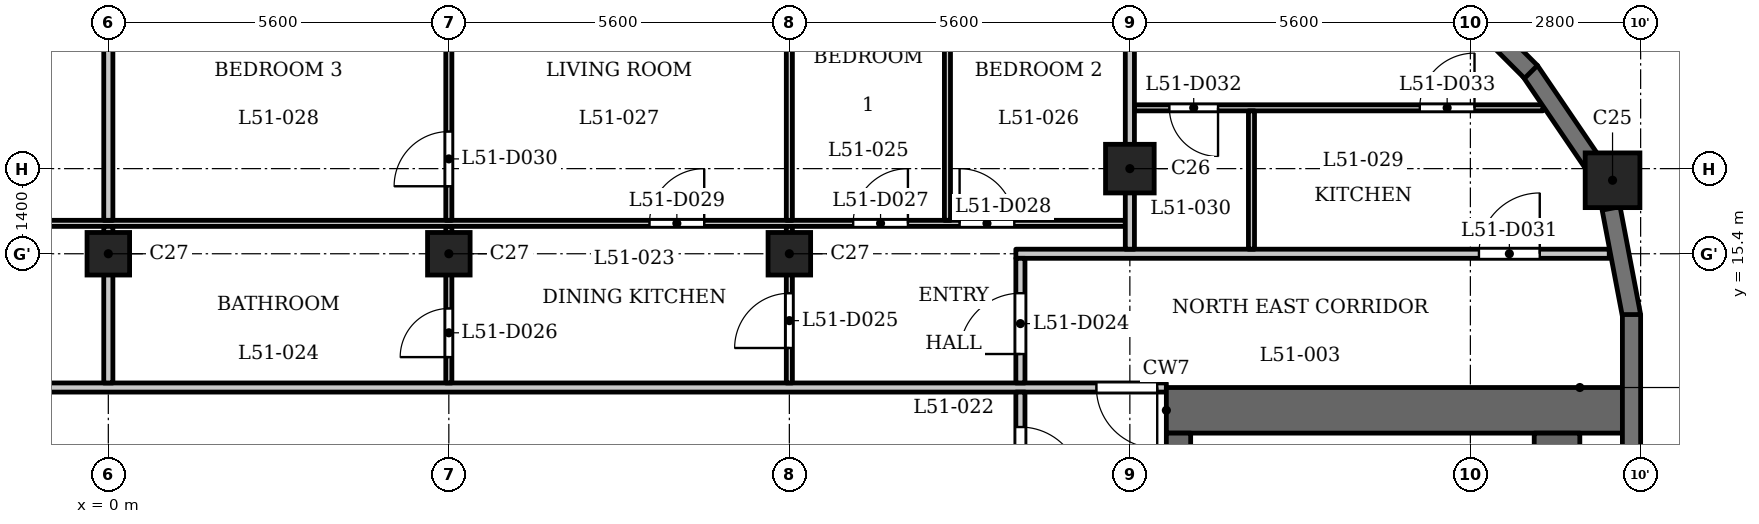
"""IFC4 building model, lengths in metres.
Left out: names, types, materials, properties, quantities, classifications, styles, units other than length and angle.
Written with IfcOpenShell. Run it as: python <this file> out.ifc"""

import sys

from ifc_helpers import new_model, si_unit, direction, frame, frame_2d, origin, origin_2d, place, context, subcontext, project, spatial, rectangle, extrude, element, fill, save


model = new_model("IFC4")
c1 = context("Model", 3, precision=1e-05, world=origin(), true_north=direction((0.0, 1.0)))
c2 = subcontext(c1, "Body", "Model", "MODEL_VIEW")
j1 = project(units=[si_unit("LENGTHUNIT", "METRE"), si_unit("PLANEANGLEUNIT", "RADIAN")], contexts=[c1])
p1 = place(None, origin())
s1 = spatial("IfcSite", under=j1, at=p1, CompositionType="ELEMENT")
p2 = place(p1, origin())
s2 = spatial("IfcBuilding", under=s1, at=p2, CompositionType="ELEMENT")
p3 = place(p2, frame((0.0, 0.0, 199.4)))
s3 = spatial("IfcBuildingStorey", under=s2, at=p3, CompositionType="ELEMENT", Elevation=199.4)
p4 = place(p3, frame((24.738, 16.609, 0.0), z_axis=(0.0, 0.0, 1.0), x_axis=(1.0, 0.0, 0.0)))
e1 = element("IfcColumn", 1, at=p4, inside=s3, PredefinedType="COLUMN", context=c2, shape_type="SweptSolid", body=[
    extrude(rectangle(XDim=0.9, YDim=0.9, at=origin_2d()), origin(), (0.0, 0.0, 1.0), 3.5),
])
p5 = place(p3, frame((16.8, 16.8, 0.0), z_axis=(0.0, 0.0, 1.0), x_axis=(1.0, 0.0, 0.0)))
e2 = element("IfcColumn", 2, at=p5, inside=s3, PredefinedType="COLUMN", context=c2, shape_type="SweptSolid", body=[
    extrude(rectangle(XDim=0.8, YDim=0.8, at=origin_2d()), origin(), (0.0, 0.0, 1.0), 3.5),
])
for number, where, z_axis, x_axis in (
    (3, (0.0, 15.4, 0.0), (0.0, 0.0, 1.0), (1.0, 0.0, 0.0)),
    (4, (5.6, 15.4, 0.0), (0.0, 0.0, 1.0), (1.0, 0.0, 0.0)),
    (5, (11.2, 15.4, 0.0), (0.0, 0.0, 1.0), (1.0, 0.0, 0.0)),
):
    element("IfcColumn", number, at=place(p3, frame(where, z_axis=z_axis, x_axis=x_axis)), inside=s3, PredefinedType="COLUMN", context=c2, shape_type="SweptSolid", body=[
        extrude(rectangle(XDim=0.7, YDim=0.7, at=origin_2d()), origin(), (0.0, 0.0, 1.0), 3.5),
    ])
p6 = place(p3, frame((25.05, 11.65, 0.0), z_axis=(0.0, 0.0, 1.0), x_axis=(0.0, 1.0, 0.0)))
e6 = element("IfcWall", 6, at=p6, inside=s3, PredefinedType="SOLIDWALL", context=c2, shape_type="SweptSolid", body=[
    extrude(rectangle(XDim=2.75, YDim=0.3, at=frame_2d((1.375, 0.0))), origin(), (0.0, 0.0, 1.0), 2.5),
])
for number, where, z_axis, x_axis in (
    (7, (25.053, 14.372, 0.0), (0.0, 0.0, 1.0), (-0.187, 0.982, 0.0)),
    (8, (24.394, 16.919, 0.0), (0.0, 0.0, 1.0), (-0.562, 0.827, 0.0)),
):
    element("IfcWall", number, at=place(p3, frame(where, z_axis=z_axis, x_axis=x_axis)), inside=s3, PredefinedType="SOLIDWALL", context=c2, shape_type="SweptSolid", body=[
        extrude(rectangle(XDim=1.806, YDim=0.3, at=frame_2d((0.903, 0.0))), origin(), (0.0, 0.0, 1.0), 2.5),
    ])
p7 = place(p3, frame((23.397, 18.391, 0.0), z_axis=(0.0, 0.0, 1.0), x_axis=(-0.707106781187, 0.707106781187, 0.0)))
e9 = element("IfcWall", 9, at=p7, inside=s3, PredefinedType="SOLIDWALL", context=c2, shape_type="SweptSolid", body=[
    extrude(rectangle(XDim=2.75, YDim=0.3, at=frame_2d((1.375, 0.0))), origin(), (0.0, 0.0, 1.0), 2.5),
])
p8 = place(p7, frame((0.775, 0.0, 0.6)))
e10 = element("IfcOpeningElement", 10, at=p8, cuts=e9, PredefinedType="OPENING", context=c2, shape_type="SweptSolid", body=[
    extrude(rectangle(XDim=1.2, YDim=1.55, at=frame_2d((0.6, 0.775))), frame((0.0, 0.16, 0.0), z_axis=(0.0, -1.0, 0.0), x_axis=(1.0, 0.0, 0.0)), (0.0, 0.0, 1.0), 0.32),
])
p9 = place(p3, frame((17.4, 12.825, 0.0), z_axis=(0.0, 0.0, 1.0), x_axis=(1.0, 0.0, 0.0)))
e11 = element("IfcWall", 11, at=p9, inside=s3, PredefinedType="SHEAR", context=c2, shape_type="SweptSolid", body=[
    extrude(rectangle(XDim=7.6, YDim=0.75, at=frame_2d((3.8, 0.0))), origin(), (0.0, 0.0, 1.0), 3.2),
])
p10 = place(p3, frame((17.6, -12.45, 0.0), z_axis=(0.0, 0.0, 1.0), x_axis=(0.0, 1.0, 0.0)))
e12 = element("IfcWall", 12, at=p10, inside=s3, PredefinedType="SHEAR", context=c2, shape_type="SweptSolid", body=[
    extrude(rectangle(XDim=24.9, YDim=0.4, at=frame_2d((12.45, 0.0))), origin(), (0.0, 0.0, 1.0), 3.2),
])
p11 = place(p10, frame((8.65, 0.0, 0.0)))
e13 = element("IfcOpeningElement", 13, at=p11, cuts=e12, PredefinedType="OPENING", context=c2, shape_type="SweptSolid", body=[
    extrude(rectangle(XDim=0.9, YDim=2.1, at=frame_2d((0.45, 1.05))), frame((0.0, 0.21, 0.0), z_axis=(0.0, -1.0, 0.0), x_axis=(1.0, 0.0, 0.0)), (0.0, 0.0, 1.0), 0.42),
])
p12 = place(p10, frame((15.6, 0.0, 0.0)))
e14 = element("IfcOpeningElement", 14, at=p12, cuts=e12, PredefinedType="OPENING", context=c2, shape_type="SweptSolid", body=[
    extrude(rectangle(XDim=1.1, YDim=2.1, at=frame_2d((0.55, 1.05))), frame((0.0, 0.21, 0.0), z_axis=(0.0, -1.0, 0.0), x_axis=(1.0, 0.0, 0.0)), (0.0, 0.0, 1.0), 0.42),
])
p13 = place(p10, frame((18.0, 0.0, 0.0)))
e15 = element("IfcOpeningElement", 15, at=p13, cuts=e12, PredefinedType="OPENING", context=c2, shape_type="SweptSolid", body=[
    extrude(rectangle(XDim=1.1, YDim=2.1, at=frame_2d((0.55, 1.05))), frame((0.0, 0.21, 0.0), z_axis=(0.0, -1.0, 0.0), x_axis=(1.0, 0.0, 0.0)), (0.0, 0.0, 1.0), 0.42),
])
p14 = place(p10, frame((23.025, 0.0, 0.0)))
e16 = element("IfcOpeningElement", 16, at=p14, cuts=e12, PredefinedType="OPENING", context=c2, shape_type="SweptSolid", body=[
    extrude(rectangle(XDim=1.1, YDim=2.1, at=frame_2d((0.55, 1.05))), frame((0.0, 0.21, 0.0), z_axis=(0.0, -1.0, 0.0), x_axis=(1.0, 0.0, 0.0)), (0.0, 0.0, 1.0), 0.42),
])
p15 = place(p10, frame((0.775, 0.0, 0.0)))
e17 = element("IfcOpeningElement", 17, at=p15, cuts=e12, PredefinedType="OPENING", context=c2, shape_type="SweptSolid", body=[
    extrude(rectangle(XDim=1.1, YDim=2.1, at=frame_2d((0.55, 1.05))), frame((0.0, 0.21, 0.0), z_axis=(0.0, -1.0, 0.0), x_axis=(1.0, 0.0, 0.0)), (0.0, 0.0, 1.0), 0.42),
])
p16 = place(p10, frame((12.925, 0.0, 0.0)))
e18 = element("IfcOpeningElement", 18, at=p16, cuts=e12, PredefinedType="OPENING", context=c2, shape_type="SweptSolid", body=[
    extrude(rectangle(XDim=1.8, YDim=2.1, at=frame_2d((0.9, 1.05))), frame((0.0, 0.21, 0.0), z_axis=(0.0, -1.0, 0.0), x_axis=(1.0, 0.0, 0.0)), (0.0, 0.0, 1.0), 0.42),
])
p17 = place(p3, frame((23.825, -12.45, 0.0), z_axis=(0.0, 0.0, 1.0), x_axis=(0.0, 1.0, 0.0)))
e19 = element("IfcWall", 19, at=p17, inside=s3, PredefinedType="SHEAR", context=c2, shape_type="SweptSolid", body=[
    extrude(rectangle(XDim=24.9, YDim=0.75, at=frame_2d((12.45, 0.0))), origin(), (0.0, 0.0, 1.0), 3.2),
])
p18 = place(p3, frame((-17.4, 13.2, 0.0), z_axis=(0.0, 0.0, 1.0), x_axis=(1.0, 0.0, 0.0)))
e20 = element("IfcWall", 20, at=p18, inside=s3, PredefinedType="PARTITIONING", context=c2, shape_type="SweptSolid", body=[
    extrude(rectangle(XDim=34.8, YDim=0.15, at=frame_2d((17.4, 0.0))), origin(), (0.0, 0.0, 1.0), 3.2),
])
p19 = place(p18, frame((0.25, 0.0, 0.0)))
e21 = element("IfcOpeningElement", 21, at=p19, cuts=e20, PredefinedType="OPENING", context=c2, shape_type="SweptSolid", body=[
    extrude(rectangle(XDim=1.0, YDim=2.1, at=frame_2d((0.5, 1.05))), frame((0.0, 0.085, 0.0), z_axis=(0.0, -1.0, 0.0), x_axis=(1.0, 0.0, 0.0)), (0.0, 0.0, 1.0), 0.17),
])
p20 = place(p18, frame((33.65, 0.0, 0.0)))
e22 = element("IfcOpeningElement", 22, at=p20, cuts=e20, PredefinedType="OPENING", context=c2, shape_type="SweptSolid", body=[
    extrude(rectangle(XDim=1.0, YDim=2.1, at=frame_2d((0.5, 1.05))), frame((0.0, 0.085, 0.0), z_axis=(0.0, -1.0, 0.0), x_axis=(1.0, 0.0, 0.0)), (0.0, 0.0, 1.0), 0.17),
])
p21 = place(p3, frame((14.925, 15.4, 0.0), z_axis=(0.0, 0.0, 1.0), x_axis=(1.0, 0.0, 0.0)))
e23 = element("IfcWall", 23, at=p21, inside=s3, PredefinedType="PARTITIONING", context=c2, shape_type="SweptSolid", body=[
    extrude(rectangle(XDim=9.759, YDim=0.15, at=frame_2d((4.879, 0.0))), origin(), (0.0, 0.0, 1.0), 3.2),
])
p22 = place(p21, frame((7.616, 0.0, 0.0)))
e24 = element("IfcOpeningElement", 24, at=p22, cuts=e23, PredefinedType="OPENING", context=c2, shape_type="SweptSolid", body=[
    extrude(rectangle(XDim=1.0, YDim=2.1, at=frame_2d((0.5, 1.05))), frame((0.0, 0.085, 0.0), z_axis=(0.0, -1.0, 0.0), x_axis=(1.0, 0.0, 0.0)), (0.0, 0.0, 1.0), 0.17),
])
p23 = place(p3, frame((-16.725, 15.9, 0.0), z_axis=(0.0, 0.0, 1.0), x_axis=(1.0, 0.0, 0.0)))
e25 = element("IfcWall", 25, at=p23, inside=s3, PredefinedType="PARTITIONING", context=c2, shape_type="SweptSolid", body=[
    extrude(rectangle(XDim=33.45, YDim=0.1, at=frame_2d((16.725, 0.0))), origin(), (0.0, 0.0, 1.0), 3.2),
])
p24 = place(p23, frame((1.875, 0.0, 0.0)))
e26 = element("IfcOpeningElement", 26, at=p24, cuts=e25, PredefinedType="OPENING", context=c2, shape_type="SweptSolid", body=[
    extrude(rectangle(XDim=0.9, YDim=2.1, at=frame_2d((0.45, 1.05))), frame((0.0, 0.06, 0.0), z_axis=(0.0, -1.0, 0.0), x_axis=(1.0, 0.0, 0.0)), (0.0, 0.0, 1.0), 0.12),
])
p25 = place(p23, frame((3.975, 0.0, 0.0)))
e27 = element("IfcOpeningElement", 27, at=p25, cuts=e25, PredefinedType="OPENING", context=c2, shape_type="SweptSolid", body=[
    extrude(rectangle(XDim=0.9, YDim=2.1, at=frame_2d((0.45, 1.05))), frame((0.0, 0.06, 0.0), z_axis=(0.0, -1.0, 0.0), x_axis=(1.0, 0.0, 0.0)), (0.0, 0.0, 1.0), 0.12),
])
p26 = place(p23, frame((6.825, 0.0, 0.0)))
e28 = element("IfcOpeningElement", 28, at=p26, cuts=e25, PredefinedType="OPENING", context=c2, shape_type="SweptSolid", body=[
    extrude(rectangle(XDim=0.9, YDim=2.1, at=frame_2d((0.45, 1.05))), frame((0.0, 0.06, 0.0), z_axis=(0.0, -1.0, 0.0), x_axis=(1.0, 0.0, 0.0)), (0.0, 0.0, 1.0), 0.12),
])
p27 = place(p23, frame((28.975, 0.0, 0.0)))
e29 = element("IfcOpeningElement", 29, at=p27, cuts=e25, PredefinedType="OPENING", context=c2, shape_type="SweptSolid", body=[
    extrude(rectangle(XDim=0.9, YDim=2.1, at=frame_2d((0.45, 1.05))), frame((0.0, 0.06, 0.0), z_axis=(0.0, -1.0, 0.0), x_axis=(1.0, 0.0, 0.0)), (0.0, 0.0, 1.0), 0.12),
])
p28 = place(p23, frame((30.725, 0.0, 0.0)))
e30 = element("IfcOpeningElement", 30, at=p28, cuts=e25, PredefinedType="OPENING", context=c2, shape_type="SweptSolid", body=[
    extrude(rectangle(XDim=0.9, YDim=2.1, at=frame_2d((0.45, 1.05))), frame((0.0, 0.06, 0.0), z_axis=(0.0, -1.0, 0.0), x_axis=(1.0, 0.0, 0.0)), (0.0, 0.0, 1.0), 0.12),
])
p29 = place(p23, frame((25.625, 0.0, 0.0)))
e31 = element("IfcOpeningElement", 31, at=p29, cuts=e25, PredefinedType="OPENING", context=c2, shape_type="SweptSolid", body=[
    extrude(rectangle(XDim=0.9, YDim=2.1, at=frame_2d((0.45, 1.05))), frame((0.0, 0.06, 0.0), z_axis=(0.0, -1.0, 0.0), x_axis=(1.0, 0.0, 0.0)), (0.0, 0.0, 1.0), 0.12),
])
p30 = place(p3, frame((16.875, 17.8, 0.0), z_axis=(0.0, 0.0, 1.0), x_axis=(1.0, 0.0, 0.0)))
e32 = element("IfcWall", 32, at=p30, inside=s3, PredefinedType="PARTITIONING", context=c2, shape_type="SweptSolid", body=[
    extrude(rectangle(XDim=6.719, YDim=0.1, at=frame_2d((3.359, 0.0))), origin(), (0.0, 0.0, 1.0), 3.2),
])
p31 = place(p30, frame((0.575, 0.0, 0.0)))
e33 = element("IfcOpeningElement", 33, at=p31, cuts=e32, PredefinedType="OPENING", context=c2, shape_type="SweptSolid", body=[
    extrude(rectangle(XDim=0.8, YDim=2.1, at=frame_2d((0.4, 1.05))), frame((0.0, 0.06, 0.0), z_axis=(0.0, -1.0, 0.0), x_axis=(1.0, 0.0, 0.0)), (0.0, 0.0, 1.0), 0.12),
])
p32 = place(p30, frame((4.693, 0.0, 0.0)))
e34 = element("IfcOpeningElement", 34, at=p32, cuts=e32, PredefinedType="OPENING", context=c2, shape_type="SweptSolid", body=[
    extrude(rectangle(XDim=0.9, YDim=2.1, at=frame_2d((0.45, 1.05))), frame((0.0, 0.06, 0.0), z_axis=(0.0, -1.0, 0.0), x_axis=(1.0, 0.0, 0.0)), (0.0, 0.0, 1.0), 0.12),
])
p33 = place(p3, frame((0.0, 13.275, 0.0), z_axis=(0.0, 0.0, 1.0), x_axis=(0.0, 1.0, 0.0)))
e35 = element("IfcWall", 35, at=p33, inside=s3, PredefinedType="PARTITIONING", context=c2, shape_type="SweptSolid", body=[
    extrude(rectangle(XDim=2.575, YDim=0.15, at=frame_2d((1.288, 0.0))), origin(), (0.0, 0.0, 1.0), 3.2),
])
p34 = place(p3, frame((0.0, 15.95, 0.0), z_axis=(0.0, 0.0, 1.0), x_axis=(0.0, 1.0, 0.0)))
e36 = element("IfcWall", 36, at=p34, inside=s3, PredefinedType="PARTITIONING", context=c2, shape_type="SweptSolid", body=[
    extrude(rectangle(XDim=6.13, YDim=0.15, at=frame_2d((3.065, 0.0))), origin(), (0.0, 0.0, 1.0), 3.2),
])
p35 = place(p3, frame((5.6, 13.275, 0.0), z_axis=(0.0, 0.0, 1.0), x_axis=(0.0, 1.0, 0.0)))
e37 = element("IfcWall", 37, at=p35, inside=s3, PredefinedType="PARTITIONING", context=c2, shape_type="SweptSolid", body=[
    extrude(rectangle(XDim=2.575, YDim=0.1, at=frame_2d((1.288, 0.0))), origin(), (0.0, 0.0, 1.0), 3.2),
])
p36 = place(p35, frame((0.425, 0.0, 0.0)))
e38 = element("IfcOpeningElement", 38, at=p36, cuts=e37, PredefinedType="OPENING", context=c2, shape_type="SweptSolid", body=[
    extrude(rectangle(XDim=0.8, YDim=2.1, at=frame_2d((0.4, 1.05))), frame((0.0, 0.06, 0.0), z_axis=(0.0, -1.0, 0.0), x_axis=(1.0, 0.0, 0.0)), (0.0, 0.0, 1.0), 0.12),
])
p37 = place(p3, frame((5.6, 15.95, 0.0), z_axis=(0.0, 0.0, 1.0), x_axis=(0.0, 1.0, 0.0)))
e39 = element("IfcWall", 39, at=p37, inside=s3, PredefinedType="PARTITIONING", context=c2, shape_type="SweptSolid", body=[
    extrude(rectangle(XDim=6.13, YDim=0.1, at=frame_2d((3.065, 0.0))), origin(), (0.0, 0.0, 1.0), 3.2),
])
p38 = place(p37, frame((0.56, 0.0, 0.0)))
e40 = element("IfcOpeningElement", 40, at=p38, cuts=e39, PredefinedType="OPENING", context=c2, shape_type="SweptSolid", body=[
    extrude(rectangle(XDim=0.9, YDim=2.1, at=frame_2d((0.45, 1.05))), frame((0.0, 0.06, 0.0), z_axis=(0.0, -1.0, 0.0), x_axis=(1.0, 0.0, 0.0)), (0.0, 0.0, 1.0), 0.12),
])
p39 = place(p3, frame((11.2, 13.275, 0.0), z_axis=(0.0, 0.0, 1.0), x_axis=(0.0, 1.0, 0.0)))
e41 = element("IfcWall", 41, at=p39, inside=s3, PredefinedType="PARTITIONING", context=c2, shape_type="SweptSolid", body=[
    extrude(rectangle(XDim=2.575, YDim=0.1, at=frame_2d((1.288, 0.0))), origin(), (0.0, 0.0, 1.0), 3.2),
])
p40 = place(p39, frame((0.575, 0.0, 0.0)))
e42 = element("IfcOpeningElement", 42, at=p40, cuts=e41, PredefinedType="OPENING", context=c2, shape_type="SweptSolid", body=[
    extrude(rectangle(XDim=0.9, YDim=2.1, at=frame_2d((0.45, 1.05))), frame((0.0, 0.06, 0.0), z_axis=(0.0, -1.0, 0.0), x_axis=(1.0, 0.0, 0.0)), (0.0, 0.0, 1.0), 0.12),
])
p41 = place(p3, frame((11.2, 15.95, 0.0), z_axis=(0.0, 0.0, 1.0), x_axis=(0.0, 1.0, 0.0)))
e43 = element("IfcWall", 43, at=p41, inside=s3, PredefinedType="PARTITIONING", context=c2, shape_type="SweptSolid", body=[
    extrude(rectangle(XDim=6.13, YDim=0.1, at=frame_2d((3.065, 0.0))), origin(), (0.0, 0.0, 1.0), 3.2),
])
p42 = place(p3, frame((13.8, 15.95, 0.0), z_axis=(0.0, 0.0, 1.0), x_axis=(0.0, 1.0, 0.0)))
e44 = element("IfcWall", 44, at=p42, inside=s3, PredefinedType="PARTITIONING", context=c2, shape_type="SweptSolid", body=[
    extrude(rectangle(XDim=6.88, YDim=0.1, at=frame_2d((3.44, 0.0))), origin(), (0.0, 0.0, 1.0), 3.2),
])
p43 = place(p3, frame((15.0, 6.769, 0.0), z_axis=(0.0, 0.0, 1.0), x_axis=(0.0, 1.0, 0.0)))
e45 = element("IfcWall", 45, at=p43, inside=s3, PredefinedType="PARTITIONING", context=c2, shape_type="SweptSolid", body=[
    extrude(rectangle(XDim=6.356, YDim=0.15, at=frame_2d((3.178, 0.0))), origin(), (0.0, 0.0, 1.0), 3.2),
])
p44 = place(p43, frame((4.781, 0.0, 0.0)))
e46 = element("IfcOpeningElement", 46, at=p44, cuts=e45, PredefinedType="OPENING", context=c2, shape_type="SweptSolid", body=[
    extrude(rectangle(XDim=1.0, YDim=2.1, at=frame_2d((0.5, 1.05))), frame((0.0, 0.085, 0.0), z_axis=(0.0, -1.0, 0.0), x_axis=(1.0, 0.0, 0.0)), (0.0, 0.0, 1.0), 0.17),
])
p45 = place(p3, frame((15.0, 13.275, 0.0), z_axis=(0.0, 0.0, 1.0), x_axis=(0.0, 1.0, 0.0)))
e47 = element("IfcWall", 47, at=p45, inside=s3, PredefinedType="PARTITIONING", context=c2, shape_type="SweptSolid", body=[
    extrude(rectangle(XDim=2.05, YDim=0.15, at=frame_2d((1.025, 0.0))), origin(), (0.0, 0.0, 1.0), 3.2),
])
p46 = place(p45, frame((0.476, 0.0, 0.0)))
e48 = element("IfcOpeningElement", 48, at=p46, cuts=e47, PredefinedType="OPENING", context=c2, shape_type="SweptSolid", body=[
    extrude(rectangle(XDim=1.0, YDim=2.1, at=frame_2d((0.5, 1.05))), frame((0.0, 0.085, 0.0), z_axis=(0.0, -1.0, 0.0), x_axis=(1.0, 0.0, 0.0)), (0.0, 0.0, 1.0), 0.17),
])
p47 = place(p3, frame((16.8, 15.475, 0.0), z_axis=(0.0, 0.0, 1.0), x_axis=(0.0, 1.0, 0.0)))
e49 = element("IfcWall", 49, at=p47, inside=s3, PredefinedType="PARTITIONING", context=c2, shape_type="SweptSolid", body=[
    extrude(rectangle(XDim=6.835, YDim=0.15, at=frame_2d((3.417, 0.0))), origin(), (0.0, 0.0, 1.0), 2.55),
])
p48 = place(p3, frame((18.8, 15.475, 0.0), z_axis=(0.0, 0.0, 1.0), x_axis=(0.0, 1.0, 0.0)))
e50 = element("IfcWall", 50, at=p48, inside=s3, PredefinedType="PARTITIONING", context=c2, shape_type="SweptSolid", body=[
    extrude(rectangle(XDim=2.275, YDim=0.1, at=frame_2d((1.137, 0.0))), origin(), (0.0, 0.0, 1.0), 3.2),
])
p49 = place(p44, origin())
e51 = element("IfcDoor", 51, at=p49, inside=s3, OperationType="SINGLE_SWING_LEFT", PredefinedType="DOOR", context=c2, shape_type="SweptSolid", body=[
    extrude(rectangle(XDim=1.0, YDim=2.1, at=frame_2d((0.5, 1.05))), frame((0.0, 0.025, 0.0), z_axis=(0.0, -1.0, 0.0), x_axis=(1.0, 0.0, 0.0)), (0.0, 0.0, 1.0), 0.05),
])
fill(e46, e51)
p50 = place(p20, origin())
e52 = element("IfcDoor", 52, at=p50, inside=s3, OperationType="SINGLE_SWING_RIGHT", PredefinedType="DOOR", context=c2, shape_type="SweptSolid", body=[
    extrude(rectangle(XDim=1.0, YDim=2.1, at=frame_2d((0.5, 1.05))), frame((0.0, 0.025, 0.0), z_axis=(0.0, -1.0, 0.0), x_axis=(1.0, 0.0, 0.0)), (0.0, 0.0, 1.0), 0.05),
])
fill(e22, e52)
p51 = place(p46, origin())
e53 = element("IfcDoor", 53, at=p51, inside=s3, OperationType="SINGLE_SWING_RIGHT", PredefinedType="DOOR", context=c2, shape_type="SweptSolid", body=[
    extrude(rectangle(XDim=1.0, YDim=2.1, at=frame_2d((0.5, 1.05))), frame((0.0, 0.025, 0.0), z_axis=(0.0, -1.0, 0.0), x_axis=(1.0, 0.0, 0.0)), (0.0, 0.0, 1.0), 0.05),
])
fill(e48, e53)
p52 = place(p40, origin())
e54 = element("IfcDoor", 54, at=p52, inside=s3, OperationType="SINGLE_SWING_RIGHT", PredefinedType="DOOR", context=c2, shape_type="SweptSolid", body=[
    extrude(rectangle(XDim=0.9, YDim=2.1, at=frame_2d((0.45, 1.05))), frame((0.0, 0.025, 0.0), z_axis=(0.0, -1.0, 0.0), x_axis=(1.0, 0.0, 0.0)), (0.0, 0.0, 1.0), 0.05),
])
fill(e42, e54)
p53 = place(p36, origin())
e55 = element("IfcDoor", 55, at=p53, inside=s3, OperationType="SINGLE_SWING_RIGHT", PredefinedType="DOOR", context=c2, shape_type="SweptSolid", body=[
    extrude(rectangle(XDim=0.8, YDim=2.1, at=frame_2d((0.4, 1.05))), frame((0.0, 0.025, 0.0), z_axis=(0.0, -1.0, 0.0), x_axis=(1.0, 0.0, 0.0)), (0.0, 0.0, 1.0), 0.05),
])
fill(e38, e55)
p54 = place(p27, origin())
e56 = element("IfcDoor", 56, at=p54, inside=s3, OperationType="SINGLE_SWING_LEFT", PredefinedType="DOOR", context=c2, shape_type="SweptSolid", body=[
    extrude(rectangle(XDim=0.9, YDim=2.1, at=frame_2d((0.45, 1.05))), frame((0.0, 0.025, 0.0), z_axis=(0.0, -1.0, 0.0), x_axis=(1.0, 0.0, 0.0)), (0.0, 0.0, 1.0), 0.05),
])
fill(e29, e56)
p55 = place(p28, origin())
e57 = element("IfcDoor", 57, at=p55, inside=s3, OperationType="SINGLE_SWING_RIGHT", PredefinedType="DOOR", context=c2, shape_type="SweptSolid", body=[
    extrude(rectangle(XDim=0.9, YDim=2.1, at=frame_2d((0.45, 1.05))), frame((0.0, 0.025, 0.0), z_axis=(0.0, -1.0, 0.0), x_axis=(1.0, 0.0, 0.0)), (0.0, 0.0, 1.0), 0.05),
])
fill(e30, e57)
p56 = place(p29, origin())
e58 = element("IfcDoor", 58, at=p56, inside=s3, OperationType="SINGLE_SWING_LEFT", PredefinedType="DOOR", context=c2, shape_type="SweptSolid", body=[
    extrude(rectangle(XDim=0.9, YDim=2.1, at=frame_2d((0.45, 1.05))), frame((0.0, 0.025, 0.0), z_axis=(0.0, -1.0, 0.0), x_axis=(1.0, 0.0, 0.0)), (0.0, 0.0, 1.0), 0.05),
])
fill(e31, e58)
p57 = place(p38, origin())
e59 = element("IfcDoor", 59, at=p57, inside=s3, OperationType="SINGLE_SWING_RIGHT", PredefinedType="DOOR", context=c2, shape_type="SweptSolid", body=[
    extrude(rectangle(XDim=0.9, YDim=2.1, at=frame_2d((0.45, 1.05))), frame((0.0, 0.025, 0.0), z_axis=(0.0, -1.0, 0.0), x_axis=(1.0, 0.0, 0.0)), (0.0, 0.0, 1.0), 0.05),
])
fill(e40, e59)
p58 = place(p22, origin())
e60 = element("IfcDoor", 60, at=p58, inside=s3, OperationType="SINGLE_SWING_LEFT", PredefinedType="DOOR", context=c2, shape_type="SweptSolid", body=[
    extrude(rectangle(XDim=1.0, YDim=2.1, at=frame_2d((0.5, 1.05))), frame((0.0, 0.025, 0.0), z_axis=(0.0, -1.0, 0.0), x_axis=(1.0, 0.0, 0.0)), (0.0, 0.0, 1.0), 0.05),
])
fill(e24, e60)
p59 = place(p31, origin())
e61 = element("IfcDoor", 61, at=p59, inside=s3, OperationType="SINGLE_SWING_RIGHT", PredefinedType="DOOR", context=c2, shape_type="SweptSolid", body=[
    extrude(rectangle(XDim=0.8, YDim=2.1, at=frame_2d((0.4, 1.05))), frame((0.0, 0.025, 0.0), z_axis=(0.0, -1.0, 0.0), x_axis=(1.0, 0.0, 0.0)), (0.0, 0.0, 1.0), 0.05),
])
fill(e33, e61)
p60 = place(p32, origin())
e62 = element("IfcDoor", 62, at=p60, inside=s3, OperationType="SINGLE_SWING_LEFT", PredefinedType="DOOR", context=c2, shape_type="SweptSolid", body=[
    extrude(rectangle(XDim=0.9, YDim=2.1, at=frame_2d((0.45, 1.05))), frame((0.0, 0.025, 0.0), z_axis=(0.0, -1.0, 0.0), x_axis=(1.0, 0.0, 0.0)), (0.0, 0.0, 1.0), 0.05),
])
fill(e34, e62)
save(model, sys.argv[1])
